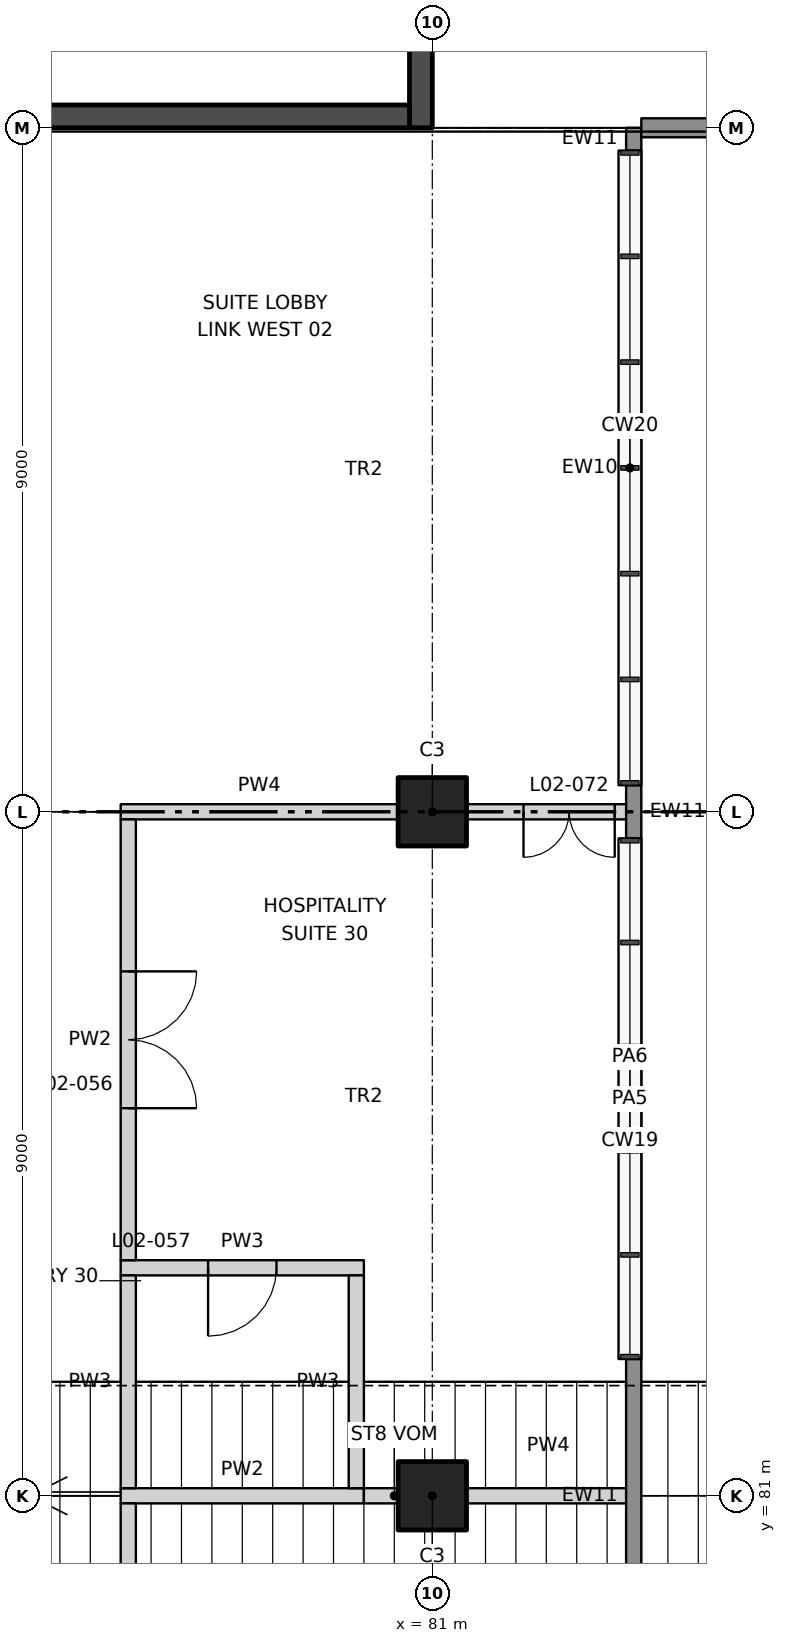
"""IFC4 building model, lengths in metres.
Left out: names, types, materials, properties, quantities, classifications, styles, units other than length and angle.
Written with IfcOpenShell. Run it as: python <this file> out.ifc"""

import sys

from ifc_helpers import new_model, si_unit, direction, frame, frame_2d, origin, origin_2d, place, context, subcontext, project, spatial, polyline, rectangle, outline, extrude, element, fill, save


model = new_model("IFC4")
c1 = context("Model", 3, precision=1e-05, world=origin(), true_north=direction((0.0, 1.0)))
c2 = subcontext(c1, "Body", "Model", "MODEL_VIEW")
j1 = project(units=[si_unit("LENGTHUNIT", "METRE"), si_unit("PLANEANGLEUNIT", "RADIAN")], contexts=[c1])
p1 = place(None, origin())
s1 = spatial("IfcSite", under=j1, at=p1, CompositionType="ELEMENT")
p2 = place(p1, origin())
s2 = spatial("IfcBuilding", under=s1, at=p2, CompositionType="ELEMENT")
p3 = place(p2, frame((0.0, 0.0, 11.5)))
s3 = spatial("IfcBuildingStorey", under=s2, at=p3, CompositionType="ELEMENT", Elevation=11.5)
for number, where, z_axis, x_axis in (
    (1, (81.0, 81.0, 0.0), (0.0, 0.0, 1.0), (1.0, 0.0, 0.0)),
    (2, (81.0, 90.0, 0.0), (0.0, 0.0, 1.0), (1.0, 0.0, 0.0)),
):
    element("IfcColumn", number, at=place(p3, frame(where, z_axis=z_axis, x_axis=x_axis)), inside=s3, PredefinedType="COLUMN", context=c2, shape_type="SweptSolid", body=[
        extrude(rectangle(XDim=0.9, YDim=0.9, at=origin_2d()), origin(), (0.0, 0.0, 1.0), 4.506),
    ])
p4 = place(p3, frame((76.9, 81.0, 0.0), z_axis=(0.0, 0.0, 1.0), x_axis=(1.0, 0.0, 0.0)))
e3 = element("IfcWall", 3, at=p4, inside=s3, PredefinedType="PARTITIONING", context=c2, shape_type="SweptSolid", body=[
    extrude(rectangle(XDim=3.2, YDim=0.2, at=frame_2d((1.6, 0.0))), origin(), (0.0, 0.0, 1.0), 4.439),
])
p5 = place(p3, frame((81.45, 81.0, 0.0), z_axis=(0.0, 0.0, 1.0), x_axis=(1.0, 0.0, 0.0)))
e4 = element("IfcWall", 4, at=p5, inside=s3, PredefinedType="PARTITIONING", context=c2, shape_type="SweptSolid", body=[
    extrude(rectangle(XDim=2.15, YDim=0.2, at=frame_2d((1.075, 0.0))), origin(), (0.0, 0.0, 1.0), 1.939),
])
p6 = place(p3, frame((80.1, 81.0, 0.0), z_axis=(0.0, 0.0, 1.0), x_axis=(1.0, 0.0, 0.0)))
e5 = element("IfcWall", 5, at=p6, inside=s3, PredefinedType="PARTITIONING", context=c2, shape_type="SweptSolid", body=[
    extrude(outline(polyline([(0.0, 0.0), (0.45, 0.0), (0.45, 4.739), (0.0, 5.02), (0.0, 0.0)])), frame((0.0, 0.1, 0.0), z_axis=(0.0, -1.0, 0.0), x_axis=(1.0, 0.0, 0.0)), (0.0, 0.0, 1.0), 0.2),
])
p7 = place(p3, frame((76.9, 84.0, 0.0), z_axis=(0.0, 0.0, 1.0), x_axis=(1.0, 0.0, 0.0)))
e6 = element("IfcWall", 6, at=p7, inside=s3, PredefinedType="PARTITIONING", context=c2, shape_type="SweptSolid", body=[
    extrude(outline(polyline([(0.0, 0.0), (3.2, 0.0), (3.2, 6.32), (2.286, 6.891), (0.0, 8.32), (0.0, 0.0)])), frame((0.0, 0.1, 0.0), z_axis=(0.0, -1.0, 0.0), x_axis=(1.0, 0.0, 0.0)), (0.0, 0.0, 1.0), 0.2),
])
p8 = place(p7, frame((1.15, 0.0, 0.0)))
e7 = element("IfcOpeningElement", 7, at=p8, cuts=e6, PredefinedType="OPENING", context=c2, shape_type="SweptSolid", body=[
    extrude(rectangle(XDim=0.9, YDim=2.1, at=frame_2d((0.45, 1.05))), frame((0.0, 0.11, 0.0), z_axis=(0.0, -1.0, 0.0), x_axis=(1.0, 0.0, 0.0)), (0.0, 0.0, 1.0), 0.22),
])
p9 = place(p3, frame((81.45, 90.0, 0.0), z_axis=(0.0, 0.0, 1.0), x_axis=(1.0, 0.0, 0.0)))
e8 = element("IfcWall", 8, at=p9, inside=s3, PredefinedType="PARTITIONING", context=c2, shape_type="SweptSolid", body=[
    extrude(outline(polyline([(0.0, 0.0), (2.15, 0.0), (2.15, 2.833), (2.079, 2.877), (0.0, 2.877), (0.0, 0.0)])), frame((0.0, 0.1, 0.0), z_axis=(0.0, -1.0, 0.0), x_axis=(1.0, 0.0, 0.0)), (0.0, 0.0, 1.0), 0.2),
])
p10 = place(p9, frame((0.75, 0.0, 0.0)))
e9 = element("IfcOpeningElement", 9, at=p10, cuts=e8, PredefinedType="OPENING", context=c2, shape_type="SweptSolid", body=[
    extrude(rectangle(XDim=1.2, YDim=2.1, at=frame_2d((0.6, 1.05))), frame((0.0, 0.11, 0.0), z_axis=(0.0, -1.0, 0.0), x_axis=(1.0, 0.0, 0.0)), (0.0, 0.0, 1.0), 0.22),
])
p11 = place(p3, frame((76.9, 90.0, 0.0), z_axis=(0.0, 0.0, 1.0), x_axis=(1.0, 0.0, 0.0)))
e10 = element("IfcWall", 10, at=p11, inside=s3, PredefinedType="PARTITIONING", context=c2, shape_type="SweptSolid", body=[
    extrude(rectangle(XDim=3.65, YDim=0.2, at=frame_2d((1.825, 0.0))), origin(), (0.0, 0.0, 1.0), 4.439),
])
p12 = place(p3, frame((77.0, 75.1, 0.0), z_axis=(0.0, 0.0, 1.0), x_axis=(0.0, 1.0, 0.0)))
e11 = element("IfcWall", 11, at=p12, inside=s3, PredefinedType="PARTITIONING", context=c2, shape_type="SweptSolid", body=[
    extrude(rectangle(XDim=5.8, YDim=0.2, at=frame_2d((2.9, 0.0))), origin(), (0.0, 0.0, 1.0), 8.258),
])
p13 = place(p12, frame((2.0, 0.0, 0.0)))
e12 = element("IfcOpeningElement", 12, at=p13, cuts=e11, PredefinedType="OPENING", context=c2, shape_type="SweptSolid", body=[
    extrude(rectangle(XDim=1.8, YDim=2.1, at=frame_2d((0.9, 1.05))), frame((0.0, 0.11, 0.0), z_axis=(0.0, -1.0, 0.0), x_axis=(1.0, 0.0, 0.0)), (0.0, 0.0, 1.0), 0.22),
])
p14 = place(p3, frame((77.0, 81.1, 0.0), z_axis=(0.0, 0.0, 1.0), x_axis=(0.0, 1.0, 0.0)))
e13 = element("IfcWall", 13, at=p14, inside=s3, PredefinedType="PARTITIONING", context=c2, shape_type="SweptSolid", body=[
    extrude(rectangle(XDim=2.8, YDim=0.2, at=frame_2d((1.4, 0.0))), origin(), (0.0, 0.0, 1.0), 8.258),
])
p15 = place(p3, frame((77.0, 84.1, 0.0), z_axis=(0.0, 0.0, 1.0), x_axis=(0.0, 1.0, 0.0)))
e14 = element("IfcWall", 14, at=p15, inside=s3, PredefinedType="PARTITIONING", context=c2, shape_type="SweptSolid", body=[
    extrude(rectangle(XDim=5.8, YDim=0.2, at=frame_2d((2.9, 0.0))), origin(), (0.0, 0.0, 1.0), 8.258),
])
p16 = place(p15, frame((2.0, 0.0, 0.0)))
e15 = element("IfcOpeningElement", 15, at=p16, cuts=e14, PredefinedType="OPENING", context=c2, shape_type="SweptSolid", body=[
    extrude(rectangle(XDim=1.8, YDim=2.1, at=frame_2d((0.9, 1.05))), frame((0.0, 0.11, 0.0), z_axis=(0.0, -1.0, 0.0), x_axis=(1.0, 0.0, 0.0)), (0.0, 0.0, 1.0), 0.22),
])
p17 = place(p3, frame((80.0, 81.1, 0.0), z_axis=(0.0, 0.0, 1.0), x_axis=(0.0, 1.0, 0.0)))
e16 = element("IfcWall", 16, at=p17, inside=s3, PredefinedType="PARTITIONING", context=c2, shape_type="SweptSolid", body=[
    extrude(rectangle(XDim=2.8, YDim=0.2, at=frame_2d((1.4, 0.0))), origin(), (0.0, 0.0, 1.0), 6.383),
])
p18 = place(p3, frame((83.65, 82.8, 0.0), z_axis=(0.0, 0.0, 1.0), x_axis=(0.0, 1.0, 0.0)))
e17 = element("IfcWall", 17, at=p18, inside=s3, PredefinedType="SOLIDWALL", context=c2, shape_type="SweptSolid", body=[
    extrude(rectangle(XDim=6.85, YDim=0.2, at=frame_2d((3.425, 0.0))), origin(), (0.0, 0.0, 1.0), 1.1),
])
p19 = place(p3, frame((83.65, 90.35, 0.0), z_axis=(0.0, 0.0, 1.0), x_axis=(0.0, 1.0, 0.0)))
e18 = element("IfcWall", 18, at=p19, inside=s3, PredefinedType="SOLIDWALL", context=c2, shape_type="SweptSolid", body=[
    extrude(rectangle(XDim=8.35, YDim=0.2, at=frame_2d((4.175, 0.0))), origin(), (0.0, 0.0, 1.0), 1.1),
])
p20 = place(p3, frame((83.65, 79.2, 0.0), z_axis=(0.0, 0.0, 1.0), x_axis=(0.0, 1.0, 0.0)))
e19 = element("IfcWall", 19, at=p20, inside=s3, PredefinedType="SOLIDWALL", context=c2, shape_type="SweptSolid", body=[
    extrude(rectangle(XDim=3.6, YDim=0.2, at=frame_2d((1.8, 0.0))), origin(), (0.0, 0.0, 1.0), 4.034),
])
p21 = place(p3, frame((83.65, 89.65, 0.0), z_axis=(0.0, 0.0, 1.0), x_axis=(0.0, 1.0, 0.0)))
e20 = element("IfcWall", 20, at=p21, inside=s3, PredefinedType="SOLIDWALL", context=c2, shape_type="SweptSolid", body=[
    extrude(rectangle(XDim=0.7, YDim=0.2, at=frame_2d((0.35, 0.0))), origin(), (0.0, 0.0, 1.0), 4.034),
])
p22 = place(p3, frame((83.65, 98.7, 0.0), z_axis=(0.0, 0.0, 1.0), x_axis=(0.0, 1.0, 0.0)))
e21 = element("IfcWall", 21, at=p22, inside=s3, PredefinedType="SOLIDWALL", context=c2, shape_type="SweptSolid", body=[
    extrude(rectangle(XDim=0.3, YDim=0.2, at=frame_2d((0.15, 0.0))), origin(), (0.0, 0.0, 1.0), 4.034),
])
p23 = place(p3, frame((80.85, 99.0, 0.0), z_axis=(0.0, 0.0, 1.0), x_axis=(0.0, 1.0, 0.0)))
e22 = element("IfcWall", 22, at=p23, inside=s3, PredefinedType="SHEAR", context=c2, shape_type="SweptSolid", body=[
    extrude(rectangle(XDim=18.0, YDim=0.3, at=frame_2d((9.0, 0.0))), origin(), (0.0, 0.0, 1.0), 10.5),
])
p24 = place(p23, frame((1.5, 0.0, 0.0)))
e23 = element("IfcOpeningElement", 23, at=p24, cuts=e22, PredefinedType="OPENING", context=c2, shape_type="SweptSolid", body=[
    extrude(rectangle(XDim=1.2, YDim=2.1, at=frame_2d((0.6, 1.05))), frame((0.0, 0.16, 0.0), z_axis=(0.0, -1.0, 0.0), x_axis=(1.0, 0.0, 0.0)), (0.0, 0.0, 1.0), 0.32),
])
p25 = place(p3, frame((80.7, 99.15, 0.0), z_axis=(0.0, 0.0, 1.0), x_axis=(-1.0, 0.0, 0.0)))
e24 = element("IfcWall", 24, at=p25, inside=s3, PredefinedType="SHEAR", context=c2, shape_type="SweptSolid", body=[
    extrude(rectangle(XDim=8.4, YDim=0.3, at=frame_2d((4.2, 0.0))), origin(), (0.0, 0.0, 1.0), 10.5),
])
p26 = place(p3, frame((83.75, 99.0, 0.0), z_axis=(0.0, 0.0, 1.0), x_axis=(1.0, 0.0, 0.0)))
e25 = element("IfcWall", 25, at=p26, inside=s3, PredefinedType="SOLIDWALL", context=c2, shape_type="SweptSolid", body=[
    extrude(rectangle(XDim=2.75, YDim=0.25, at=frame_2d((1.375, 0.0))), origin(), (0.0, 0.0, 1.0), 1.217),
])
p27 = place(p16, frame((1.8, 0.0, 0.0), z_axis=(0.0, 0.0, 1.0), x_axis=(-1.0, 0.0, 0.0)))
e26 = element("IfcDoor", 26, at=p27, inside=s3, OperationType="DOUBLE_DOOR_DOUBLE_SWING", PredefinedType="DOOR", context=c2, shape_type="SweptSolid", body=[
    extrude(rectangle(XDim=1.8, YDim=2.1, at=frame_2d((0.9, 1.05))), frame((0.0, 0.025, 0.0), z_axis=(0.0, -1.0, 0.0), x_axis=(1.0, 0.0, 0.0)), (0.0, 0.0, 1.0), 0.05),
])
fill(e15, e26)
p28 = place(p8, frame((0.9, 0.0, 0.0), z_axis=(0.0, 0.0, 1.0), x_axis=(-1.0, 0.0, 0.0)))
e27 = element("IfcDoor", 27, at=p28, inside=s3, OperationType="SINGLE_SWING_RIGHT", PredefinedType="DOOR", context=c2, shape_type="SweptSolid", body=[
    extrude(rectangle(XDim=0.9, YDim=2.1, at=frame_2d((0.45, 1.05))), frame((0.0, 0.025, 0.0), z_axis=(0.0, -1.0, 0.0), x_axis=(1.0, 0.0, 0.0)), (0.0, 0.0, 1.0), 0.05),
])
fill(e7, e27)
p29 = place(p10, frame((1.2, 0.0, 0.0), z_axis=(0.0, 0.0, 1.0), x_axis=(-1.0, 0.0, 0.0)))
e28 = element("IfcDoor", 28, at=p29, inside=s3, OperationType="DOUBLE_DOOR_DOUBLE_SWING", PredefinedType="DOOR", context=c2, shape_type="SweptSolid", body=[
    extrude(rectangle(XDim=1.2, YDim=2.1, at=frame_2d((0.6, 1.05))), frame((0.0, 0.025, 0.0), z_axis=(0.0, -1.0, 0.0), x_axis=(1.0, 0.0, 0.0)), (0.0, 0.0, 1.0), 0.05),
])
fill(e9, e28)
save(model, sys.argv[1])
